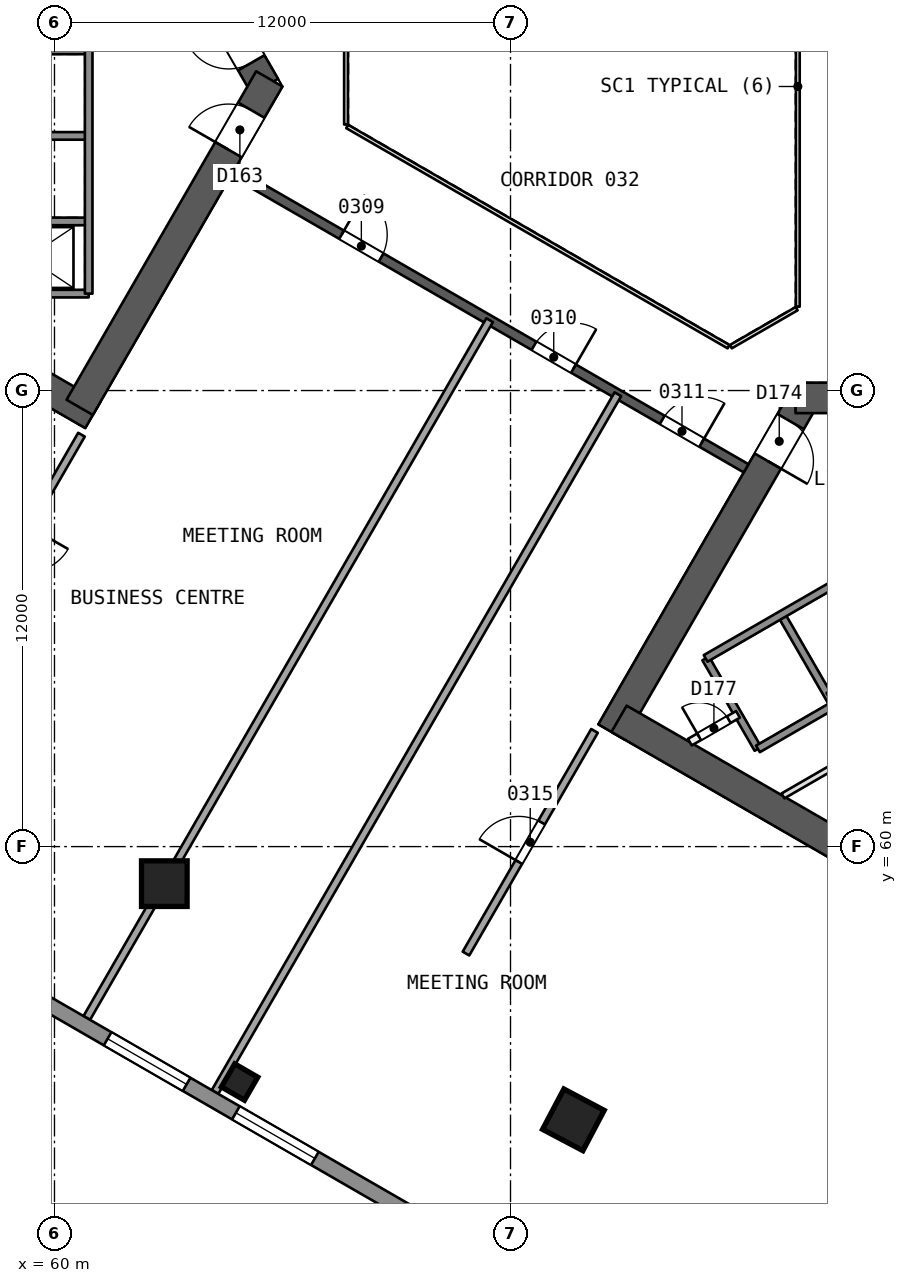
"""IFC4 building model, lengths in metres.
Left out: names, types, materials, properties, quantities, classifications, styles, units other than length and angle.
Written with IfcOpenShell. Run it as: python <this file> out.ifc"""

import sys

from ifc_helpers import new_model, si_unit, direction, frame, frame_2d, origin, origin_2d, place, context, subcontext, project, spatial, rectangle, extrude, element, fill, save


model = new_model("IFC4")
c1 = context("Model", 3, precision=1e-05, world=origin(), true_north=direction((0.0, 1.0)))
c2 = subcontext(c1, "Body", "Model", "MODEL_VIEW")
j1 = project(units=[si_unit("LENGTHUNIT", "METRE"), si_unit("PLANEANGLEUNIT", "RADIAN")], contexts=[c1])
p1 = place(None, origin())
s1 = spatial("IfcSite", under=j1, at=p1, CompositionType="ELEMENT")
p2 = place(p1, origin())
s2 = spatial("IfcBuilding", under=s1, at=p2, CompositionType="ELEMENT")
p3 = place(p2, frame((0.0, 0.0, 20.4)))
s3 = spatial("IfcBuildingStorey", under=s2, at=p3, CompositionType="ELEMENT", Elevation=20.4)
p4 = place(p3, frame((65.538, 80.0, 0.0), z_axis=(0.0, 0.0, 1.0), x_axis=(-0.49999662545, 0.866027352073, 0.0)))
e1 = element("IfcWall", 1, at=p4, inside=s3, PredefinedType="SHEAR", context=c2, shape_type="SweptSolid", body=[
    extrude(rectangle(XDim=10.149, YDim=0.8, at=frame_2d((5.074, 0.0))), origin(), (0.0, 0.0, 1.0), 5.0),
])
p5 = place(p4, frame((0.719, 0.0, 0.0)))
e2 = element("IfcOpeningElement", 2, at=p5, cuts=e1, PredefinedType="OPENING", context=c2, shape_type="SweptSolid", body=[
    extrude(rectangle(XDim=1.2, YDim=2.1, at=frame_2d((0.6, 1.05))), frame((0.0, 0.411, 0.0), z_axis=(0.0, -1.0, 0.0), x_axis=(1.0, 0.0, 0.0)), (0.0, 0.0, 1.0), 0.821),
])
p6 = place(p3, frame((48.797, 78.408, 0.0), z_axis=(0.0, 0.0, 1.0), x_axis=(0.866032504327, -0.499987701298, 0.0)))
e3 = element("IfcWall", 3, at=p6, inside=s3, PredefinedType="SHEAR", context=c2, shape_type="SweptSolid", body=[
    extrude(rectangle(XDim=14.102, YDim=0.8, at=frame_2d((7.051, 0.0))), origin(), (0.0, 0.0, 1.0), 5.0),
])
p7 = place(p3, frame((60.664, 71.557, 0.0), z_axis=(0.0, 0.0, 1.0), x_axis=(0.50000409368, 0.866023040284, 0.0)))
e4 = element("IfcWall", 4, at=p7, inside=s3, PredefinedType="SHEAR", context=c2, shape_type="SweptSolid", body=[
    extrude(rectangle(XDim=9.98, YDim=0.8, at=frame_2d((4.99, 0.0))), origin(), (0.0, 0.0, 1.0), 5.0),
])
p8 = place(p7, frame((7.83, 0.0, 0.0)))
e5 = element("IfcOpeningElement", 5, at=p8, cuts=e4, PredefinedType="OPENING", context=c2, shape_type="SweptSolid", body=[
    extrude(rectangle(XDim=1.2, YDim=2.1, at=frame_2d((0.6, 1.05))), frame((0.0, 0.411, 0.0), z_axis=(0.0, -1.0, 0.0), x_axis=(1.0, 0.0, 0.0)), (0.0, 0.0, 1.0), 0.821),
])
p9 = place(p3, frame((79.731, 71.806, 0.0), z_axis=(0.0, 0.0, 1.0), x_axis=(-0.49999662545, -0.866027352073, 0.0)))
e6 = element("IfcWall", 6, at=p9, inside=s3, PredefinedType="SHEAR", context=c2, shape_type="SweptSolid", body=[
    extrude(rectangle(XDim=10.149, YDim=0.8, at=frame_2d((5.074, 0.0))), origin(), (0.0, 0.0, 1.0), 5.0),
])
p10 = place(p9, frame((0.719, 0.0, 0.0)))
e7 = element("IfcOpeningElement", 7, at=p10, cuts=e6, PredefinedType="OPENING", context=c2, shape_type="SweptSolid", body=[
    extrude(rectangle(XDim=1.2, YDim=2.1, at=frame_2d((0.6, 1.05))), frame((0.0, 0.411, 0.0), z_axis=(0.0, -1.0, 0.0), x_axis=(1.0, 0.0, 0.0)), (0.0, 0.0, 1.0), 0.821),
])
p11 = place(p3, frame((74.856, 63.363, 0.0), z_axis=(0.0, 0.0, 1.0), x_axis=(0.866029478545, -0.499992942241, 0.0)))
e8 = element("IfcWall", 8, at=p11, inside=s3, PredefinedType="SHEAR", context=c2, shape_type="SweptSolid", body=[
    extrude(rectangle(XDim=13.933, YDim=0.8, at=frame_2d((6.967, 0.0))), origin(), (0.0, 0.0, 1.0), 5.0),
])
p12 = place(p3, frame((89.48, 71.806, 0.0), z_axis=(0.0, 0.0, 1.0), x_axis=(-1.0, 0.0, 0.0)))
e9 = element("IfcWall", 9, at=p12, inside=s3, PredefinedType="SHEAR", context=c2, shape_type="SweptSolid", body=[
    extrude(rectangle(XDim=9.98, YDim=0.8, at=frame_2d((4.99, 0.0))), origin(), (0.0, 0.0, 1.0), 5.0),
])
p13 = place(p12, frame((7.83, 0.0, 0.0)))
e10 = element("IfcOpeningElement", 10, at=p13, cuts=e9, PredefinedType="OPENING", context=c2, shape_type="SweptSolid", body=[
    extrude(rectangle(XDim=1.2, YDim=2.1, at=frame_2d((0.6, 1.05))), frame((0.0, 0.411, 0.0), z_axis=(0.0, -1.0, 0.0), x_axis=(1.0, 0.0, 0.0)), (0.0, 0.0, 1.0), 0.821),
])
p14 = place(p3, frame((64.7, 77.748, 0.0), z_axis=(0.0, 0.0, 1.0), x_axis=(0.866026492143, -0.499998114903, 0.0)))
e11 = element("IfcWall", 11, at=p14, inside=s3, PredefinedType="SHEAR", context=c2, shape_type="SweptSolid", body=[
    extrude(rectangle(XDim=15.588, YDim=0.25, at=frame_2d((7.794, 0.0))), origin(), (0.0, 0.0, 1.0), 4.5),
])
p15 = place(p14, frame((3.297, 0.0, 0.0)))
e12 = element("IfcOpeningElement", 12, at=p15, cuts=e11, PredefinedType="OPENING", context=c2, shape_type="SweptSolid", body=[
    extrude(rectangle(XDim=1.2, YDim=2.4, at=frame_2d((0.6, 1.2))), frame((0.0, 0.135, 0.0), z_axis=(0.0, -1.0, 0.0), x_axis=(1.0, 0.0, 0.0)), (0.0, 0.0, 1.0), 0.271),
])
p16 = place(p14, frame((9.143, 0.0, 0.0)))
e13 = element("IfcOpeningElement", 13, at=p16, cuts=e11, PredefinedType="OPENING", context=c2, shape_type="SweptSolid", body=[
    extrude(rectangle(XDim=1.2, YDim=2.4, at=frame_2d((0.6, 1.2))), frame((0.0, 0.135, 0.0), z_axis=(0.0, -1.0, 0.0), x_axis=(1.0, 0.0, 0.0)), (0.0, 0.0, 1.0), 0.271),
])
p17 = place(p14, frame((13.04, 0.0, 0.0)))
e14 = element("IfcOpeningElement", 14, at=p17, cuts=e11, PredefinedType="OPENING", context=c2, shape_type="SweptSolid", body=[
    extrude(rectangle(XDim=1.2, YDim=2.4, at=frame_2d((0.6, 1.2))), frame((0.0, 0.135, 0.0), z_axis=(0.0, -1.0, 0.0), x_axis=(1.0, 0.0, 0.0)), (0.0, 0.0, 1.0), 0.271),
])
p18 = place(p3, frame((62.878, 59.004, 0.0), z_axis=(0.010056548747, 0.017476914813, 0.999796690971), x_axis=(-0.498646620807, -0.866570811206, 0.020163747768)))
e15 = element("IfcColumn", 15, at=p18, inside=s3, PredefinedType="COLUMN", context=c2, shape_type="SweptSolid", body=[
    extrude(rectangle(XDim=1.2, YDim=1.2, at=origin_2d()), origin(), (0.0, 0.0, 1.0), 5.001),
])
p19 = place(p3, frame((73.654, 52.783, 0.0), z_axis=(0.000878676521, 0.022845589543, 0.999738619323), x_axis=(-0.500716902272, -0.865375021167, 0.020215254597)))
e16 = element("IfcColumn", 16, at=p19, inside=s3, PredefinedType="COLUMN", context=c2, shape_type="SweptSolid", body=[
    extrude(rectangle(XDim=1.2, YDim=1.2, at=origin_2d()), origin(), (0.0, 0.0, 1.0), 5.001),
])
p20 = place(p3, frame((64.871, 53.805, 0.0), z_axis=(0.0, 0.0, 1.0), x_axis=(0.5, 0.866025403784, 0.0)))
e17 = element("IfcColumn", 17, at=p20, inside=s3, PredefinedType="COLUMN", context=c2, shape_type="SweptSolid", body=[
    extrude(rectangle(XDim=0.7, YDim=0.7, at=origin_2d()), origin(), (0.0, 0.0, 1.0), 5.0),
])
p21 = place(p3, frame((60.85, 55.491, 0.0), z_axis=(0.0, 0.0, 1.0), x_axis=(0.499994584841, 0.866028530205, 0.0)))
e18 = element("IfcWall", 18, at=p21, inside=s3, PredefinedType="PARTITIONING", context=c2, shape_type="SweptSolid", body=[
    extrude(rectangle(XDim=21.201, YDim=0.2, at=frame_2d((10.601, 0.0))), origin(), (0.0, 0.0, 1.0), 4.5),
])
p22 = place(p3, frame((60.71, 70.838, 0.0), z_axis=(0.0, 0.0, 1.0), x_axis=(-0.499981745636, -0.86603594269, 0.0)))
e19 = element("IfcWall", 19, at=p22, inside=s3, PredefinedType="PARTITIONING", context=c2, shape_type="SweptSolid", body=[
    extrude(rectangle(XDim=6.765, YDim=0.2, at=frame_2d((3.382, 0.0))), origin(), (0.0, 0.0, 1.0), 4.5),
])
p23 = place(p22, frame((2.782, 0.0, 0.0)))
e20 = element("IfcOpeningElement", 20, at=p23, cuts=e19, PredefinedType="OPENING", context=c2, shape_type="SweptSolid", body=[
    extrude(rectangle(XDim=1.2, YDim=2.4, at=frame_2d((0.6, 1.2))), frame((0.0, 0.11, 0.0), z_axis=(0.0, -1.0, 0.0), x_axis=(1.0, 0.0, 0.0)), (0.0, 0.0, 1.0), 0.221),
])
p24 = place(p3, frame((64.225, 53.542, 0.0), z_axis=(0.0, 0.0, 1.0), x_axis=(0.499994584841, 0.866028530205, 0.0)))
e21 = element("IfcWall", 21, at=p24, inside=s3, PredefinedType="PARTITIONING", context=c2, shape_type="SweptSolid", body=[
    extrude(rectangle(XDim=21.201, YDim=0.2, at=frame_2d((10.601, 0.0))), origin(), (0.0, 0.0, 1.0), 4.5),
])
p25 = place(p3, frame((70.828, 57.186, 0.0), z_axis=(0.0, 0.0, 1.0), x_axis=(0.499981745636, 0.86603594269, 0.0)))
e22 = element("IfcWall", 22, at=p25, inside=s3, PredefinedType="PARTITIONING", context=c2, shape_type="SweptSolid", body=[
    extrude(rectangle(XDim=6.765, YDim=0.2, at=frame_2d((3.382, 0.0))), origin(), (0.0, 0.0, 1.0), 4.5),
])
p26 = place(p25, frame((2.782, 0.0, 0.0)))
e23 = element("IfcOpeningElement", 23, at=p26, cuts=e22, PredefinedType="OPENING", context=c2, shape_type="SweptSolid", body=[
    extrude(rectangle(XDim=1.2, YDim=2.4, at=frame_2d((0.6, 1.2))), frame((0.0, 0.11, 0.0), z_axis=(0.0, -1.0, 0.0), x_axis=(1.0, 0.0, 0.0)), (0.0, 0.0, 1.0), 0.221),
])
p27 = place(p3, frame((94.84, 35.636, 0.0), z_axis=(0.0, 0.0, 1.0), x_axis=(-0.866025599265, 0.499999661418, 0.0)))
e24 = element("IfcWall", 24, at=p27, inside=s3, PredefinedType="SOLIDWALL", context=c2, shape_type="SweptSolid", body=[
    extrude(rectangle(XDim=78.727, YDim=0.4, at=frame_2d((39.364, 0.0))), origin(), (0.0, 0.0, 1.0), 4.5),
])
p28 = place(p27, frame((42.061, 0.0, 0.9)))
e25 = element("IfcOpeningElement", 25, at=p28, cuts=e24, PredefinedType="OPENING", context=c2, shape_type="SweptSolid", body=[
    extrude(rectangle(XDim=2.4, YDim=2.4, at=frame_2d((1.2, 1.2))), frame((0.0, 0.21, 0.0), z_axis=(0.0, -1.0, 0.0), x_axis=(1.0, 0.0, 0.0)), (0.0, 0.0, 1.0), 0.421),
])
p29 = place(p27, frame((36.215, 0.0, 0.9)))
e26 = element("IfcOpeningElement", 26, at=p29, cuts=e24, PredefinedType="OPENING", context=c2, shape_type="SweptSolid", body=[
    extrude(rectangle(XDim=2.4, YDim=2.4, at=frame_2d((1.2, 1.2))), frame((0.0, 0.21, 0.0), z_axis=(0.0, -1.0, 0.0), x_axis=(1.0, 0.0, 0.0)), (0.0, 0.0, 1.0), 0.421),
])
p30 = place(p27, frame((32.318, 0.0, 0.9)))
e27 = element("IfcOpeningElement", 27, at=p30, cuts=e24, PredefinedType="OPENING", context=c2, shape_type="SweptSolid", body=[
    extrude(rectangle(XDim=2.4, YDim=2.4, at=frame_2d((1.2, 1.2))), frame((0.0, 0.21, 0.0), z_axis=(0.0, -1.0, 0.0), x_axis=(1.0, 0.0, 0.0)), (0.0, 0.0, 1.0), 0.421),
])
for number, where, z_axis, x_axis in (
    (28, (60.9, 80.95, 0.0), (0.0, 0.0, 1.0), (-1.0, 0.0, 0.0)),
    (29, (60.9, 78.7, 0.0), (0.0, 0.0, 1.0), (-1.0, 0.0, 0.0)),
):
    element("IfcWall", number, at=place(p3, frame(where, z_axis=z_axis, x_axis=x_axis)), inside=s3, PredefinedType="SOLIDWALL", context=c2, shape_type="SweptSolid", body=[
        extrude(rectangle(XDim=2.48, YDim=0.2, at=frame_2d((1.24, 0.0))), origin(), (0.0, 0.0, 1.0), 4.5),
    ])
for number, where, z_axis, x_axis in (
    (30, (60.9, 76.45, 0.0), (0.0, 0.0, 1.0), (-1.0, 0.0, 0.0)),
    (31, (60.9, 74.55, 0.0), (0.0, 0.0, 1.0), (-1.0, 0.0, 0.0)),
):
    element("IfcWall", number, at=place(p3, frame(where, z_axis=z_axis, x_axis=x_axis)), inside=s3, PredefinedType="SOLIDWALL", context=c2, shape_type="SweptSolid", body=[
        extrude(rectangle(XDim=3.05, YDim=0.2, at=frame_2d((1.525, 0.0))), origin(), (0.0, 0.0, 1.0), 4.5),
    ])
p31 = place(p3, frame((60.9, 85.45, 0.0), z_axis=(0.0, 0.0, 1.0), x_axis=(0.0, -1.0, 0.0)))
e32 = element("IfcWall", 32, at=p31, inside=s3, PredefinedType="SOLIDWALL", context=c2, shape_type="SweptSolid", body=[
    extrude(rectangle(XDim=10.9, YDim=0.2, at=frame_2d((5.45, 0.0))), origin(), (0.0, 0.0, 1.0), 4.5),
])
for number, where, z_axis, x_axis in (
    (33, (77.135, 64.952, 0.0), (0.0, 0.0, 1.0), (0.5, -0.866, 0.0)),
    (34, (79.127, 66.102, 0.0), (0.0, 0.0, 1.0), (0.5, -0.866, 0.0)),
):
    element("IfcWall", number, at=place(p3, frame(where, z_axis=z_axis, x_axis=x_axis)), inside=s3, PredefinedType="SOLIDWALL", context=c2, shape_type="SweptSolid", body=[
        extrude(rectangle(XDim=2.75, YDim=0.2, at=frame_2d((1.375, 0.0))), origin(), (0.0, 0.0, 1.0), 4.5),
    ])
p32 = place(p3, frame((77.135, 64.952, 0.0), z_axis=(0.0, 0.0, 1.0), x_axis=(0.866031916153, 0.499988720078, 0.0)))
e35 = element("IfcWall", 35, at=p32, inside=s3, PredefinedType="SOLIDWALL", context=c2, shape_type="SweptSolid", body=[
    extrude(rectangle(XDim=11.35, YDim=0.2, at=frame_2d((5.675, 0.0))), origin(), (0.0, 0.0, 1.0), 4.5),
])
p33 = place(p3, frame((76.72, 62.749, 0.0), z_axis=(0.0, 0.0, 1.0), x_axis=(0.866054810376, 0.49994906283, 0.0)))
e36 = element("IfcWall", 36, at=p33, inside=s3, PredefinedType="PARTITIONING", context=c2, shape_type="SweptSolid", body=[
    extrude(rectangle(XDim=1.461, YDim=0.2, at=frame_2d((0.73, 0.0))), origin(), (0.0, 0.0, 1.0), 4.5),
])
p34 = place(p33, frame((0.281, 0.0, 0.0)))
e37 = element("IfcOpeningElement", 37, at=p34, cuts=e36, PredefinedType="OPENING", context=c2, shape_type="SweptSolid", body=[
    extrude(rectangle(XDim=0.9, YDim=2.1, at=frame_2d((0.45, 1.05))), frame((0.0, 0.11, 0.0), z_axis=(0.0, -1.0, 0.0), x_axis=(1.0, 0.0, 0.0)), (0.0, 0.0, 1.0), 0.221),
])
p35 = place(p3, frame((80.367, 63.954, 0.0), z_axis=(0.0, 0.0, 1.0), x_axis=(0.866026575979, 0.499997969693, 0.0)))
e38 = element("IfcWall", 38, at=p35, inside=s3, PredefinedType="SOLIDWALL", context=c2, shape_type="SweptSolid", body=[
    extrude(rectangle(XDim=6.75, YDim=0.2, at=frame_2d((3.375, 0.0))), origin(), (0.0, 0.0, 1.0), 4.5),
])
p36 = place(p3, frame((78.51, 62.57, 0.0), z_axis=(0.0, 0.0, 1.0), x_axis=(0.866053019151, 0.499952165731, 0.0)))
e39 = element("IfcWall", 39, at=p36, inside=s3, PredefinedType="SOLIDWALL", context=c2, shape_type="SweptSolid", body=[
    extrude(rectangle(XDim=2.3, YDim=0.2, at=frame_2d((1.15, 0.0))), origin(), (0.0, 0.0, 1.0), 4.5),
])
p37 = place(p3, frame((79.17, 61.334, 0.0), z_axis=(0.0, 0.0, 1.0), x_axis=(0.866030041738, 0.499991966744, 0.0)))
e40 = element("IfcWall", 40, at=p37, inside=s3, PredefinedType="PARTITIONING", context=c2, shape_type="SweptSolid", body=[
    extrude(rectangle(XDim=2.222, YDim=0.15, at=frame_2d((1.111, 0.0))), origin(), (0.0, 0.0, 1.0), 4.5),
])
p38 = place(p3, frame((79.56, 74.206, 0.0), z_axis=(0.0, 0.0, 1.0), x_axis=(0.0, 1.0, 0.0)))
e41 = element("IfcWall", 41, at=p38, inside=s3, PredefinedType="PARTITIONING", context=c2, shape_type="SweptSolid", body=[
    extrude(rectangle(XDim=11.588, YDim=0.1, at=frame_2d((5.794, 0.0))), origin(), (0.0, 0.0, 1.0), 4.5),
])
p39 = place(p3, frame((67.672, 81.0, 0.0), z_axis=(0.0, 0.0, 1.0), x_axis=(0.0, -1.0, 0.0)))
e42 = element("IfcWall", 42, at=p39, inside=s3, PredefinedType="PARTITIONING", context=c2, shape_type="SweptSolid", body=[
    extrude(rectangle(XDim=2.0, YDim=0.1, at=frame_2d((1.0, 0.0))), origin(), (0.0, 0.0, 1.0), 4.5),
])
p40 = place(p3, frame((67.702, 78.948, 0.0), z_axis=(0.0, 0.0, 1.0), x_axis=(0.866026658274, -0.499997827154, 0.0)))
e43 = element("IfcWall", 43, at=p40, inside=s3, PredefinedType="PARTITIONING", context=c2, shape_type="SweptSolid", body=[
    extrude(rectangle(XDim=11.588, YDim=0.1, at=frame_2d((5.794, 0.0))), origin(), (0.0, 0.0, 1.0), 4.5),
])
p41 = place(p3, frame((77.798, 73.154, 0.0), z_axis=(0.0, 0.0, 1.0), x_axis=(0.866041268327, 0.499972520799, 0.0)))
e44 = element("IfcWall", 44, at=p41, inside=s3, PredefinedType="PARTITIONING", context=c2, shape_type="SweptSolid", body=[
    extrude(rectangle(XDim=2.0, YDim=0.1, at=frame_2d((1.0, 0.0))), origin(), (0.0, 0.0, 1.0), 4.5),
])
p42 = place(p15, origin())
e45 = element("IfcDoor", 45, at=p42, inside=s3, OperationType="SINGLE_SWING_LEFT", PredefinedType="NOTDEFINED", context=c2, shape_type="SweptSolid", body=[
    extrude(rectangle(XDim=1.2, YDim=2.4, at=frame_2d((0.6, 1.2))), frame((0.0, 0.025, 0.0), z_axis=(0.0, -1.0, 0.0), x_axis=(1.0, 0.0, 0.0)), (0.0, 0.0, 1.0), 0.05),
])
fill(e12, e45)
p43 = place(p16, origin())
e46 = element("IfcDoor", 46, at=p43, inside=s3, OperationType="SINGLE_SWING_RIGHT", PredefinedType="NOTDEFINED", context=c2, shape_type="SweptSolid", body=[
    extrude(rectangle(XDim=1.2, YDim=2.4, at=frame_2d((0.6, 1.2))), frame((0.0, 0.025, 0.0), z_axis=(0.0, -1.0, 0.0), x_axis=(1.0, 0.0, 0.0)), (0.0, 0.0, 1.0), 0.05),
])
fill(e13, e46)
p44 = place(p17, origin())
e47 = element("IfcDoor", 47, at=p44, inside=s3, OperationType="SINGLE_SWING_RIGHT", PredefinedType="NOTDEFINED", context=c2, shape_type="SweptSolid", body=[
    extrude(rectangle(XDim=1.2, YDim=2.4, at=frame_2d((0.6, 1.2))), frame((0.0, 0.025, 0.0), z_axis=(0.0, -1.0, 0.0), x_axis=(1.0, 0.0, 0.0)), (0.0, 0.0, 1.0), 0.05),
])
fill(e14, e47)
p45 = place(p26, origin())
e48 = element("IfcDoor", 48, at=p45, inside=s3, OperationType="SINGLE_SWING_LEFT", PredefinedType="NOTDEFINED", context=c2, shape_type="SweptSolid", body=[
    extrude(rectangle(XDim=1.2, YDim=2.4, at=frame_2d((0.6, 1.2))), frame((0.0, 0.025, 0.0), z_axis=(0.0, -1.0, 0.0), x_axis=(1.0, 0.0, 0.0)), (0.0, 0.0, 1.0), 0.05),
])
fill(e23, e48)
p46 = place(p29, origin())
e49 = element("IfcWindow", 49, at=p46, inside=s3, PartitioningType="SINGLE_PANEL", PredefinedType="WINDOW", context=c2, shape_type="SweptSolid", body=[
    extrude(rectangle(XDim=2.4, YDim=2.4, at=frame_2d((1.2, 1.2))), frame((0.0, 0.03, 0.0), z_axis=(0.0, -1.0, 0.0), x_axis=(1.0, 0.0, 0.0)), (0.0, 0.0, 1.0), 0.06),
])
fill(e26, e49)
p47 = place(p30, origin())
e50 = element("IfcWindow", 50, at=p47, inside=s3, PartitioningType="SINGLE_PANEL", PredefinedType="WINDOW", context=c2, shape_type="SweptSolid", body=[
    extrude(rectangle(XDim=2.4, YDim=2.4, at=frame_2d((1.2, 1.2))), frame((0.0, 0.03, 0.0), z_axis=(0.0, -1.0, 0.0), x_axis=(1.0, 0.0, 0.0)), (0.0, 0.0, 1.0), 0.06),
])
fill(e27, e50)
p48 = place(p5, origin())
e51 = element("IfcDoor", 51, at=p48, inside=s3, OperationType="SINGLE_SWING_RIGHT", PredefinedType="NOTDEFINED", context=c2, shape_type="SweptSolid", body=[
    extrude(rectangle(XDim=1.2, YDim=2.1, at=frame_2d((0.6, 1.05))), frame((0.0, 0.025, 0.0), z_axis=(0.0, -1.0, 0.0), x_axis=(1.0, 0.0, 0.0)), (0.0, 0.0, 1.0), 0.05),
])
fill(e2, e51)
p49 = place(p8, origin())
e52 = element("IfcDoor", 52, at=p49, inside=s3, OperationType="SINGLE_SWING_LEFT", PredefinedType="NOTDEFINED", context=c2, shape_type="SweptSolid", body=[
    extrude(rectangle(XDim=1.2, YDim=2.1, at=frame_2d((0.6, 1.05))), frame((0.0, 0.025, 0.0), z_axis=(0.0, -1.0, 0.0), x_axis=(1.0, 0.0, 0.0)), (0.0, 0.0, 1.0), 0.05),
])
fill(e5, e52)
p50 = place(p10, origin())
e53 = element("IfcDoor", 53, at=p50, inside=s3, OperationType="SINGLE_SWING_RIGHT", PredefinedType="NOTDEFINED", context=c2, shape_type="SweptSolid", body=[
    extrude(rectangle(XDim=1.2, YDim=2.1, at=frame_2d((0.6, 1.05))), frame((0.0, 0.025, 0.0), z_axis=(0.0, -1.0, 0.0), x_axis=(1.0, 0.0, 0.0)), (0.0, 0.0, 1.0), 0.05),
])
fill(e7, e53)
p51 = place(p34, origin())
e54 = element("IfcDoor", 54, at=p51, inside=s3, OperationType="SINGLE_SWING_LEFT", PredefinedType="NOTDEFINED", context=c2, shape_type="SweptSolid", body=[
    extrude(rectangle(XDim=0.9, YDim=2.1, at=frame_2d((0.45, 1.05))), frame((0.0, 0.025, 0.0), z_axis=(0.0, -1.0, 0.0), x_axis=(1.0, 0.0, 0.0)), (0.0, 0.0, 1.0), 0.05),
])
fill(e37, e54)
save(model, sys.argv[1])
